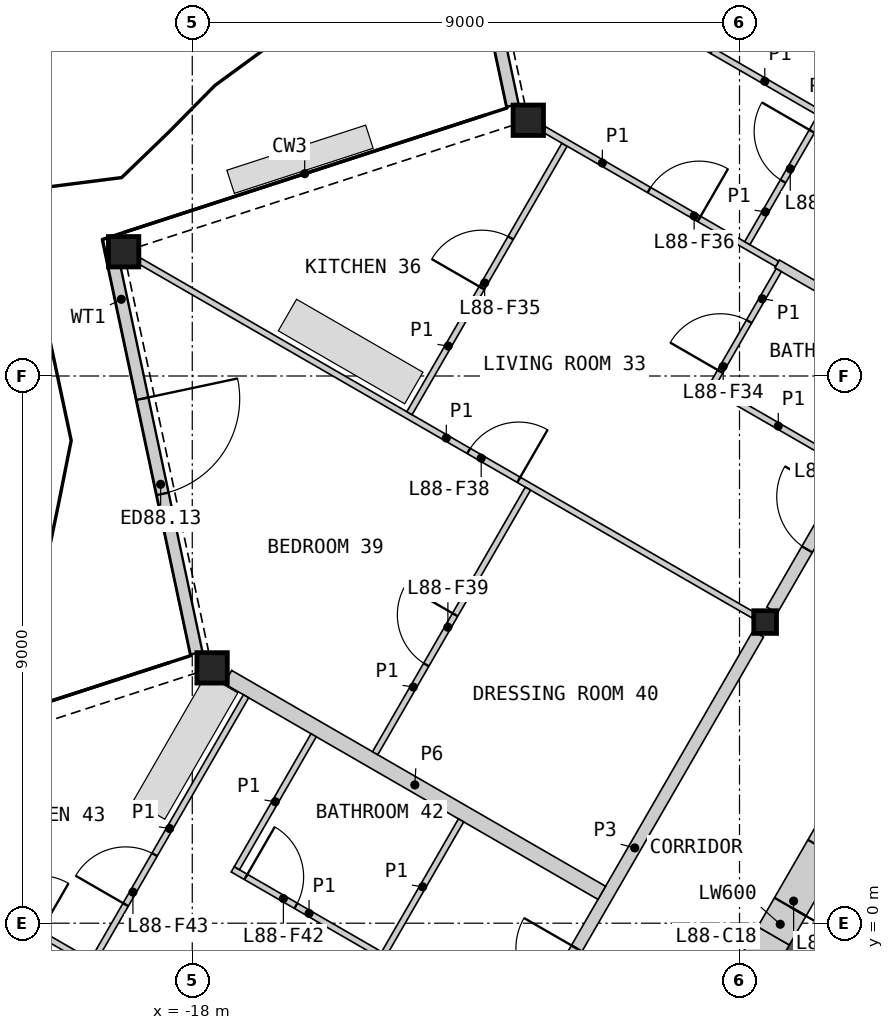
"""IFC4 building model, lengths in metres.
Left out: names, types, materials, properties, quantities, classifications, styles, units other than length and angle.
Written with IfcOpenShell. Run it as: python <this file> out.ifc"""

import sys

from ifc_helpers import new_model, si_unit, direction, frame, frame_2d, origin, origin_2d, place, context, subcontext, project, spatial, polyline, rectangle, hollow_rectangle, i_section, outline, extrude, element, fill, save


model = new_model("IFC4")
c1 = context("Model", 3, precision=1e-05, world=origin(), true_north=direction((0.0, 1.0)))
c2 = subcontext(c1, "Body", "Model", "MODEL_VIEW")
j1 = project(units=[si_unit("LENGTHUNIT", "METRE"), si_unit("PLANEANGLEUNIT", "RADIAN")], contexts=[c1])
p1 = place(None, origin())
s1 = spatial("IfcSite", under=j1, at=p1, CompositionType="ELEMENT")
p2 = place(p1, origin())
s2 = spatial("IfcBuilding", under=s1, at=p2, CompositionType="ELEMENT")
p3 = place(p2, frame((0.0, 0.0, 388.2)))
s3 = spatial("IfcBuildingStorey", under=s2, at=p3, CompositionType="ELEMENT", Elevation=388.2)
for number, where, z_axis, x_axis in (
    (1, (-12.474, 13.206, 0.0), (0.0, 0.0, 1.0), (1.0, 0.0, 0.0)),
    (2, (-19.129, 11.044, 0.0), (0.0, 0.0, 1.0), (1.0, 0.0, 0.0)),
    (3, (-17.674, 4.199, 0.0), (0.0, 0.0, 1.0), (1.0, 0.0, 0.0)),
):
    element("IfcColumn", number, at=place(p3, frame(where, z_axis=z_axis, x_axis=x_axis)), inside=s3, PredefinedType="COLUMN", context=c2, shape_type="SweptSolid", body=[
        extrude(hollow_rectangle(XDim=0.5, YDim=0.5, WallThickness=0.03, at=origin_2d()), origin(), (0.0, 0.0, 1.0), 3.4),
    ])
p4 = place(p3, frame((-8.578, 4.953, 0.0), z_axis=(0.0, 0.0, 1.0), x_axis=(1.0, 0.0, 0.0)))
e4 = element("IfcColumn", 4, at=p4, inside=s3, PredefinedType="COLUMN", context=c2, shape_type="SweptSolid", body=[
    extrude(i_section(OverallWidth=0.374, OverallDepth=0.372, WebThickness=0.016, FlangeThickness=0.026, at=origin_2d()), origin(), (0.0, 0.0, 1.0), 3.4),
])
p5 = place(p3, frame((-14.104, 19.915, 0.0), z_axis=(0.0, 0.0, 1.0), x_axis=(0.207924998532, -0.978144771997, 0.0)))
e5 = element("IfcWall", 5, at=p5, inside=s3, PredefinedType="SOLIDWALL", context=c2, shape_type="SweptSolid", body=[
    extrude(rectangle(XDim=6.612, YDim=0.2, at=frame_2d((3.306, 0.0))), origin(), (0.0, 0.0, 1.0), 2.634),
])
p6 = place(p5, frame((2.333, 0.0, 0.0)))
e6 = element("IfcOpeningElement", 6, at=p6, cuts=e5, PredefinedType="OPENING", context=c2, shape_type="SweptSolid", body=[
    extrude(rectangle(XDim=1.6, YDim=2.25, at=frame_2d((0.8, 1.125))), frame((0.0, 0.11, 0.0), z_axis=(0.0, -1.0, 0.0), x_axis=(1.0, 0.0, 0.0)), (0.0, 0.0, 1.0), 0.22),
])
p7 = place(p3, frame((-19.304, 10.909, 0.0), z_axis=(0.0, 0.0, 1.0), x_axis=(0.207882161022, -0.97815387702, 0.0)))
e7 = element("IfcWall", 7, at=p7, inside=s3, PredefinedType="SOLIDWALL", context=c2, shape_type="SweptSolid", body=[
    extrude(rectangle(XDim=6.612, YDim=0.2, at=frame_2d((3.306, 0.0))), origin(), (0.0, 0.0, 1.0), 2.634),
])
p8 = place(p7, frame((2.333, 0.0, 0.0)))
e8 = element("IfcOpeningElement", 8, at=p8, cuts=e7, PredefinedType="OPENING", context=c2, shape_type="SweptSolid", body=[
    extrude(rectangle(XDim=1.6, YDim=2.25, at=frame_2d((0.8, 1.125))), frame((0.0, 0.11, 0.0), z_axis=(0.0, -1.0, 0.0), x_axis=(1.0, 0.0, 0.0)), (0.0, 0.0, 1.0), 0.22),
])
p9 = place(p3, origin())
e9 = element("IfcWall", 9, at=p9, inside=s3, PredefinedType="SHEAR", context=c2, shape_type="SweptSolid", body=[
    extrude(outline(polyline([(-6.061, -1.697), (-8.231, -0.444), (-8.131, -0.271), (-5.96, -1.524), (-6.061, -1.697)])), origin(), (0.0, 0.0, 1.0), 3.1),
])
p10 = place(p3, frame((-8.44, -0.208, 0.0), z_axis=(0.0, 0.0, 1.0), x_axis=(-0.500001951578, -0.866024277037, 0.0)))
e10 = element("IfcWall", 10, at=p10, inside=s3, PredefinedType="SHEAR", context=c2, shape_type="SweptSolid", body=[
    extrude(rectangle(XDim=2.243, YDim=0.6, at=frame_2d((1.122, 0.0))), origin(), (0.0, 0.0, 1.0), 3.1),
])
p11 = place(p10, frame((0.7, 0.0, 0.0)))
e11 = element("IfcOpeningElement", 11, at=p11, cuts=e10, PredefinedType="OPENING", context=c2, shape_type="SweptSolid", body=[
    extrude(rectangle(XDim=1.0, YDim=2.1, at=frame_2d((0.5, 1.05))), frame((0.0, 0.31, 0.0), z_axis=(0.0, -1.0, 0.0), x_axis=(1.0, 0.0, 0.0)), (0.0, 0.0, 1.0), 0.62),
])
p12 = place(p3, frame((-7.34, 1.698, 0.0), z_axis=(0.0, 0.0, 1.0), x_axis=(-0.50002983664, -0.866008176907, 0.0)))
e12 = element("IfcWall", 12, at=p12, inside=s3, PredefinedType="SHEAR", context=c2, shape_type="SweptSolid", body=[
    extrude(rectangle(XDim=2.2, YDim=0.6, at=frame_2d((1.1, 0.0))), origin(), (0.0, 0.0, 1.0), 3.1),
])
p13 = place(p12, frame((0.55, 0.0, 0.0)))
e13 = element("IfcOpeningElement", 13, at=p13, cuts=e12, PredefinedType="OPENING", context=c2, shape_type="SweptSolid", body=[
    extrude(rectangle(XDim=1.1, YDim=2.1, at=frame_2d((0.55, 1.05))), frame((0.0, 0.31, 0.0), z_axis=(0.0, -1.0, 0.0), x_axis=(1.0, 0.0, 0.0)), (0.0, 0.0, 1.0), 0.62),
])
p14 = place(p3, frame((-8.465, 5.15, 0.0), z_axis=(0.0, 0.0, 1.0), x_axis=(0.499992155518, 0.866029932751, 0.0)))
e14 = element("IfcWall", 14, at=p14, inside=s3, PredefinedType="PARTITIONING", context=c2, shape_type="SweptSolid", body=[
    extrude(rectangle(XDim=8.123, YDim=0.2, at=frame_2d((4.062, 0.0))), origin(), (0.0, 0.0, 1.0), 3.1),
])
p15 = place(p14, frame((1.153, 0.0, 0.0)))
e15 = element("IfcOpeningElement", 15, at=p15, cuts=e14, PredefinedType="OPENING", context=c2, shape_type="SweptSolid", body=[
    extrude(rectangle(XDim=1.0, YDim=2.1, at=frame_2d((0.5, 1.05))), frame((0.0, 0.11, 0.0), z_axis=(0.0, -1.0, 0.0), x_axis=(1.0, 0.0, 0.0)), (0.0, 0.0, 1.0), 0.22),
])
p16 = place(p3, frame((-12.754, -2.279, 0.0), z_axis=(0.0, 0.0, 1.0), x_axis=(0.500001682468, 0.866024432409, 0.0)))
e16 = element("IfcWall", 16, at=p16, inside=s3, PredefinedType="PARTITIONING", context=c2, shape_type="SweptSolid", body=[
    extrude(rectangle(XDim=8.124, YDim=0.2, at=frame_2d((4.062, 0.0))), origin(), (0.0, 0.0, 1.0), 3.1),
])
p17 = place(p16, frame((1.153, 0.0, 0.0)))
e17 = element("IfcOpeningElement", 17, at=p17, cuts=e16, PredefinedType="OPENING", context=c2, shape_type="SweptSolid", body=[
    extrude(rectangle(XDim=1.0, YDim=2.1, at=frame_2d((0.5, 1.05))), frame((0.0, 0.11, 0.0), z_axis=(0.0, -1.0, 0.0), x_axis=(1.0, 0.0, 0.0)), (0.0, 0.0, 1.0), 0.22),
])
p18 = place(p3, frame((-17.414, 4.049, 0.0), z_axis=(0.0, 0.0, 1.0), x_axis=(0.866033839264, -0.499985389037, 0.0)))
e18 = element("IfcWall", 18, at=p18, inside=s3, PredefinedType="PARTITIONING", context=c2, shape_type="SweptSolid", body=[
    extrude(rectangle(XDim=7.1, YDim=0.25, at=frame_2d((3.55, 0.0))), origin(), (0.0, 0.0, 1.0), 2.33),
])
p19 = place(p3, frame((-8.382, 10.844, 0.0), z_axis=(0.0, 0.0, 1.0), x_axis=(0.866021425885, -0.500006889861, 0.0)))
e19 = element("IfcWall", 19, at=p19, inside=s3, PredefinedType="PLUMBINGWALL", context=c2, shape_type="SweptSolid", body=[
    extrude(rectangle(XDim=2.675, YDim=0.15, at=frame_2d((1.337, 0.0))), origin(), (0.0, 0.0, 1.0), 2.33),
])
p20 = place(p3, frame((-24.069, 1.887, 0.0), z_axis=(0.0, 0.0, 1.0), x_axis=(0.866023404247, -0.500003463284, 0.0)))
e20 = element("IfcWall", 20, at=p20, inside=s3, PredefinedType="PARTITIONING", context=c2, shape_type="SweptSolid", body=[
    extrude(rectangle(XDim=11.782, YDim=0.1, at=frame_2d((5.891, 0.0))), origin(), (0.0, 0.0, 1.0), 2.33),
])
p21 = place(p20, frame((3.159, 0.0, 0.0)))
e21 = element("IfcOpeningElement", 21, at=p21, cuts=e20, PredefinedType="OPENING", context=c2, shape_type="SweptSolid", body=[
    extrude(rectangle(XDim=0.95, YDim=2.1, at=frame_2d((0.475, 1.05))), frame((0.0, 0.06, 0.0), z_axis=(0.0, -1.0, 0.0), x_axis=(1.0, 0.0, 0.0)), (0.0, 0.0, 1.0), 0.12),
])
p22 = place(p3, frame((-18.869, 10.894, 0.0), z_axis=(0.0, 0.0, 1.0), x_axis=(0.866023724155, -0.500002909193, 0.0)))
e22 = element("IfcWall", 22, at=p22, inside=s3, PredefinedType="PARTITIONING", context=c2, shape_type="SweptSolid", body=[
    extrude(rectangle(XDim=11.655, YDim=0.1, at=frame_2d((5.827, 0.0))), origin(), (0.0, 0.0, 1.0), 2.33),
])
p23 = place(p22, frame((6.253, 0.0, 0.0)))
e23 = element("IfcOpeningElement", 23, at=p23, cuts=e22, PredefinedType="OPENING", context=c2, shape_type="SweptSolid", body=[
    extrude(rectangle(XDim=0.95, YDim=2.1, at=frame_2d((0.475, 1.05))), frame((0.0, 0.06, 0.0), z_axis=(0.0, -1.0, 0.0), x_axis=(1.0, 0.0, 0.0)), (0.0, 0.0, 1.0), 0.12),
])
p24 = place(p3, frame((-9.517, 14.328, 0.0), z_axis=(0.0, 0.0, 1.0), x_axis=(0.499996545922, 0.866027397988, 0.0)))
e24 = element("IfcWall", 24, at=p24, inside=s3, PredefinedType="PARTITIONING", context=c2, shape_type="SweptSolid", body=[
    extrude(rectangle(XDim=5.5, YDim=0.1, at=frame_2d((2.75, 0.0))), origin(), (0.0, 0.0, 1.0), 2.33),
])
p25 = place(p24, frame((4.3, 0.0, 0.0)))
e25 = element("IfcOpeningElement", 25, at=p25, cuts=e24, PredefinedType="OPENING", context=c2, shape_type="SweptSolid", body=[
    extrude(rectangle(XDim=0.95, YDim=2.1, at=frame_2d((0.475, 1.05))), frame((0.0, 0.06, 0.0), z_axis=(0.0, -1.0, 0.0), x_axis=(1.0, 0.0, 0.0)), (0.0, 0.0, 1.0), 0.12),
])
p26 = place(p24, frame((0.25, 0.0, 0.0)))
e26 = element("IfcOpeningElement", 26, at=p26, cuts=e24, PredefinedType="OPENING", context=c2, shape_type="SweptSolid", body=[
    extrude(rectangle(XDim=0.95, YDim=2.1, at=frame_2d((0.475, 1.05))), frame((0.0, 0.06, 0.0), z_axis=(0.0, -1.0, 0.0), x_axis=(1.0, 0.0, 0.0)), (0.0, 0.0, 1.0), 0.12),
])
p27 = place(p3, frame((-19.628, -0.619, 0.0), z_axis=(0.0, 0.0, 1.0), x_axis=(0.499990214365, 0.86603105345, 0.0)))
e27 = element("IfcWall", 27, at=p27, inside=s3, PredefinedType="PARTITIONING", context=c2, shape_type="SweptSolid", body=[
    extrude(rectangle(XDim=5.025, YDim=0.1, at=frame_2d((2.512, 0.0))), origin(), (0.0, 0.0, 1.0), 2.33),
])
p28 = place(p27, frame((1.067, 0.0, 0.0)))
e28 = element("IfcOpeningElement", 28, at=p28, cuts=e27, PredefinedType="OPENING", context=c2, shape_type="SweptSolid", body=[
    extrude(rectangle(XDim=0.95, YDim=2.1, at=frame_2d((0.475, 1.05))), frame((0.0, 0.06, 0.0), z_axis=(0.0, -1.0, 0.0), x_axis=(1.0, 0.0, 0.0)), (0.0, 0.0, 1.0), 0.12),
])
p29 = place(p3, frame((-14.992, 2.796, 0.0), z_axis=(0.0, 0.0, 1.0), x_axis=(0.499990214365, 0.86603105345, 0.0)))
e29 = element("IfcWall", 29, at=p29, inside=s3, PredefinedType="PARTITIONING", context=c2, shape_type="SweptSolid", body=[
    extrude(rectangle(XDim=5.025, YDim=0.1, at=frame_2d((2.512, 0.0))), origin(), (0.0, 0.0, 1.0), 2.33),
])
p30 = place(p29, frame((1.68, 0.0, 0.0)))
e30 = element("IfcOpeningElement", 30, at=p30, cuts=e29, PredefinedType="OPENING", context=c2, shape_type="SweptSolid", body=[
    extrude(rectangle(XDim=0.95, YDim=2.1, at=frame_2d((0.475, 1.05))), frame((0.0, 0.06, 0.0), z_axis=(0.0, -1.0, 0.0), x_axis=(1.0, 0.0, 0.0)), (0.0, 0.0, 1.0), 0.12),
])
p31 = place(p3, frame((-14.428, 8.388, 0.0), z_axis=(0.0, 0.0, 1.0), x_axis=(0.500005610874, 0.86602216432, 0.0)))
e31 = element("IfcWall", 31, at=p31, inside=s3, PredefinedType="PARTITIONING", context=c2, shape_type="SweptSolid", body=[
    extrude(rectangle(XDim=5.1, YDim=0.1, at=frame_2d((2.55, 0.0))), origin(), (0.0, 0.0, 1.0), 2.33),
])
p32 = place(p31, frame((2.379, 0.0, 0.0)))
e32 = element("IfcOpeningElement", 32, at=p32, cuts=e31, PredefinedType="OPENING", context=c2, shape_type="SweptSolid", body=[
    extrude(rectangle(XDim=0.95, YDim=2.1, at=frame_2d((0.475, 1.05))), frame((0.0, 0.06, 0.0), z_axis=(0.0, -1.0, 0.0), x_axis=(1.0, 0.0, 0.0)), (0.0, 0.0, 1.0), 0.12),
])
p33 = place(p3, frame((-12.214, 13.056, 0.0), z_axis=(0.0, 0.0, 1.0), x_axis=(0.866017452598, -0.500013771606, 0.0)))
e33 = element("IfcWall", 33, at=p33, inside=s3, PredefinedType="PARTITIONING", context=c2, shape_type="SweptSolid", body=[
    extrude(rectangle(XDim=4.425, YDim=0.1, at=frame_2d((2.213, 0.0))), origin(), (0.0, 0.0, 1.0), 2.33),
])
p34 = place(p33, frame((1.994, 0.0, 0.0)))
e34 = element("IfcOpeningElement", 34, at=p34, cuts=e33, PredefinedType="OPENING", context=c2, shape_type="SweptSolid", body=[
    extrude(rectangle(XDim=0.95, YDim=2.1, at=frame_2d((0.475, 1.05))), frame((0.0, 0.06, 0.0), z_axis=(0.0, -1.0, 0.0), x_axis=(1.0, 0.0, 0.0)), (0.0, 0.0, 1.0), 0.12),
])
p35 = place(p3, frame((-17.335, 0.886, 0.0), z_axis=(0.0, 0.0, 1.0), x_axis=(0.866032775405, -0.499987231761, 0.0)))
e35 = element("IfcWall", 35, at=p35, inside=s3, PredefinedType="PARTITIONING", context=c2, shape_type="SweptSolid", body=[
    extrude(rectangle(XDim=2.9, YDim=0.1, at=frame_2d((1.45, 0.0))), origin(), (0.0, 0.0, 1.0), 2.33),
])
p36 = place(p35, frame((0.25, 0.0, 0.0)))
e36 = element("IfcOpeningElement", 36, at=p36, cuts=e35, PredefinedType="OPENING", context=c2, shape_type="SweptSolid", body=[
    extrude(rectangle(XDim=0.95, YDim=2.1, at=frame_2d((0.475, 1.05))), frame((0.0, 0.06, 0.0), z_axis=(0.0, -1.0, 0.0), x_axis=(1.0, 0.0, 0.0)), (0.0, 0.0, 1.0), 0.12),
])
p37 = place(p3, frame((-9.51, 8.839, 0.0), z_axis=(0.0, 0.0, 1.0), x_axis=(0.866029095148, -0.499993606316, 0.0)))
e37 = element("IfcWall", 37, at=p37, inside=s3, PredefinedType="PARTITIONING", context=c2, shape_type="SweptSolid", body=[
    extrude(rectangle(XDim=2.65, YDim=0.1, at=frame_2d((1.325, 0.0))), origin(), (0.0, 0.0, 1.0), 2.33),
])
p38 = place(p3, frame((-17.267, 0.905, 0.0), z_axis=(0.0, 0.0, 1.0), x_axis=(0.499976333282, 0.866039067339, 0.0)))
e38 = element("IfcWall", 38, at=p38, inside=s3, PredefinedType="PARTITIONING", context=c2, shape_type="SweptSolid", body=[
    extrude(rectangle(XDim=2.525, YDim=0.1, at=frame_2d((1.262, 0.0))), origin(), (0.0, 0.0, 1.0), 2.33),
])
p39 = place(p3, frame((-14.842, -0.496, 0.0), z_axis=(0.0, 0.0, 1.0), x_axis=(0.500048846702, 0.865997200291, 0.0)))
e39 = element("IfcWall", 39, at=p39, inside=s3, PredefinedType="PARTITIONING", context=c2, shape_type="SweptSolid", body=[
    extrude(rectangle(XDim=2.525, YDim=0.1, at=frame_2d((1.263, 0.0))), origin(), (0.0, 0.0, 1.0), 2.33),
])
p40 = place(p3, frame((-8.872, 11.184, 0.0), z_axis=(0.0, 0.0, 1.0), x_axis=(0.499986429846, 0.866033238375, 0.0)))
e40 = element("IfcWall", 40, at=p40, inside=s3, PredefinedType="PARTITIONING", context=c2, shape_type="SweptSolid", body=[
    extrude(rectangle(XDim=2.375, YDim=0.1, at=frame_2d((1.188, 0.0))), origin(), (0.0, 0.0, 1.0), 2.33),
])
p41 = place(p40, frame((1.175, 0.0, 0.0)))
e41 = element("IfcOpeningElement", 41, at=p41, cuts=e40, PredefinedType="OPENING", context=c2, shape_type="SweptSolid", body=[
    extrude(rectangle(XDim=0.95, YDim=2.1, at=frame_2d((0.475, 1.05))), frame((0.0, 0.06, 0.0), z_axis=(0.0, -1.0, 0.0), x_axis=(1.0, 0.0, 0.0)), (0.0, 0.0, 1.0), 0.12),
])
p42 = place(p3, frame((-9.442, 8.858, 0.0), z_axis=(0.0, 0.0, 1.0), x_axis=(0.499978335414, 0.866037911478, 0.0)))
e42 = element("IfcWall", 42, at=p42, inside=s3, PredefinedType="PARTITIONING", context=c2, shape_type="SweptSolid", body=[
    extrude(rectangle(XDim=2.175, YDim=0.1, at=frame_2d((1.087, 0.0))), origin(), (0.0, 0.0, 1.0), 2.33),
])
p43 = place(p42, frame((0.25, 0.0, 0.0)))
e43 = element("IfcOpeningElement", 43, at=p43, cuts=e42, PredefinedType="OPENING", context=c2, shape_type="SweptSolid", body=[
    extrude(rectangle(XDim=0.95, YDim=2.1, at=frame_2d((0.475, 1.05))), frame((0.0, 0.06, 0.0), z_axis=(0.0, -1.0, 0.0), x_axis=(1.0, 0.0, 0.0)), (0.0, 0.0, 1.0), 0.12),
])
p44 = place(p3, frame((-9.448, 14.346, 0.0), z_axis=(0.0, 0.0, 1.0), x_axis=(0.866020521143, -0.500008456887, 0.0)))
e44 = element("IfcWall", 44, at=p44, inside=s3, PredefinedType="PARTITIONING", context=c2, shape_type="SweptSolid", body=[
    extrude(rectangle(XDim=1.995, YDim=0.1, at=frame_2d((0.998, 0.0))), origin(), (0.0, 0.0, 1.0), 2.33),
])
p45 = place(p8, origin())
e45 = element("IfcDoor", 45, at=p45, inside=s3, OperationType="DOUBLE_DOOR_SINGLE_SWING", PredefinedType="DOOR", context=c2, shape_type="SweptSolid", body=[
    extrude(rectangle(XDim=1.6, YDim=2.25, at=frame_2d((0.8, 1.125))), frame((0.0, 0.025, 0.0), z_axis=(0.0, -1.0, 0.0), x_axis=(1.0, 0.0, 0.0)), (0.0, 0.0, 1.0), 0.05),
])
fill(e8, e45)
p46 = place(p13, origin())
e46 = element("IfcDoor", 46, at=p46, inside=s3, OperationType="SINGLE_SWING_RIGHT", PredefinedType="DOOR", context=c2, shape_type="SweptSolid", body=[
    extrude(rectangle(XDim=1.1, YDim=2.1, at=frame_2d((0.55, 1.05))), frame((0.0, 0.055, 0.0), z_axis=(0.0, -1.0, 0.0), x_axis=(1.0, 0.0, 0.0)), (0.0, 0.0, 1.0), 0.05),
])
fill(e13, e46)
p47 = place(p15, origin())
e47 = element("IfcDoor", 47, at=p47, inside=s3, OperationType="SINGLE_SWING_RIGHT", PredefinedType="DOOR", context=c2, shape_type="SweptSolid", body=[
    extrude(rectangle(XDim=1.0, YDim=2.1, at=frame_2d((0.5, 1.05))), frame((0.0, 0.025, 0.0), z_axis=(0.0, -1.0, 0.0), x_axis=(1.0, 0.0, 0.0)), (0.0, 0.0, 1.0), 0.05),
])
fill(e15, e47)
p48 = place(p43, origin())
e48 = element("IfcDoor", 48, at=p48, inside=s3, OperationType="SINGLE_SWING_LEFT", PredefinedType="DOOR", context=c2, shape_type="SweptSolid", body=[
    extrude(rectangle(XDim=0.95, YDim=2.1, at=frame_2d((0.475, 1.05))), frame((0.0, 0.025, 0.0), z_axis=(0.0, -1.0, 0.0), x_axis=(1.0, 0.0, 0.0)), (0.0, 0.0, 1.0), 0.05),
])
fill(e43, e48)
p49 = place(p32, origin())
e49 = element("IfcDoor", 49, at=p49, inside=s3, OperationType="SINGLE_SWING_LEFT", PredefinedType="DOOR", context=c2, shape_type="SweptSolid", body=[
    extrude(rectangle(XDim=0.95, YDim=2.1, at=frame_2d((0.475, 1.05))), frame((0.0, 0.025, 0.0), z_axis=(0.0, -1.0, 0.0), x_axis=(1.0, 0.0, 0.0)), (0.0, 0.0, 1.0), 0.05),
])
fill(e32, e49)
p50 = place(p34, origin())
e50 = element("IfcDoor", 50, at=p50, inside=s3, OperationType="SINGLE_SWING_RIGHT", PredefinedType="DOOR", context=c2, shape_type="SweptSolid", body=[
    extrude(rectangle(XDim=0.95, YDim=2.1, at=frame_2d((0.475, 1.05))), frame((0.0, 0.025, 0.0), z_axis=(0.0, -1.0, 0.0), x_axis=(1.0, 0.0, 0.0)), (0.0, 0.0, 1.0), 0.05),
])
fill(e34, e50)
p51 = place(p41, origin())
e51 = element("IfcDoor", 51, at=p51, inside=s3, OperationType="SINGLE_SWING_RIGHT", PredefinedType="DOOR", context=c2, shape_type="SweptSolid", body=[
    extrude(rectangle(XDim=0.95, YDim=2.1, at=frame_2d((0.475, 1.05))), frame((0.0, 0.025, 0.0), z_axis=(0.0, -1.0, 0.0), x_axis=(1.0, 0.0, 0.0)), (0.0, 0.0, 1.0), 0.05),
])
fill(e41, e51)
p52 = place(p23, origin())
e52 = element("IfcDoor", 52, at=p52, inside=s3, OperationType="SINGLE_SWING_RIGHT", PredefinedType="DOOR", context=c2, shape_type="SweptSolid", body=[
    extrude(rectangle(XDim=0.95, YDim=2.1, at=frame_2d((0.475, 1.05))), frame((0.0, 0.025, 0.0), z_axis=(0.0, -1.0, 0.0), x_axis=(1.0, 0.0, 0.0)), (0.0, 0.0, 1.0), 0.05),
])
fill(e23, e52)
p53 = place(p30, origin())
e53 = element("IfcDoor", 53, at=p53, inside=s3, OperationType="SINGLE_SWING_RIGHT", PredefinedType="DOOR", context=c2, shape_type="SweptSolid", body=[
    extrude(rectangle(XDim=0.95, YDim=2.1, at=frame_2d((0.475, 1.05))), frame((0.0, 0.025, 0.0), z_axis=(0.0, -1.0, 0.0), x_axis=(1.0, 0.0, 0.0)), (0.0, 0.0, 1.0), 0.05),
])
fill(e30, e53)
p54 = place(p17, origin())
e54 = element("IfcDoor", 54, at=p54, inside=s3, OperationType="SINGLE_SWING_RIGHT", PredefinedType="DOOR", context=c2, shape_type="SweptSolid", body=[
    extrude(rectangle(XDim=1.0, YDim=2.1, at=frame_2d((0.5, 1.05))), frame((0.0, 0.025, 0.0), z_axis=(0.0, -1.0, 0.0), x_axis=(1.0, 0.0, 0.0)), (0.0, 0.0, 1.0), 0.05),
])
fill(e17, e54)
p55 = place(p36, origin())
e55 = element("IfcDoor", 55, at=p55, inside=s3, OperationType="SINGLE_SWING_LEFT", PredefinedType="DOOR", context=c2, shape_type="SweptSolid", body=[
    extrude(rectangle(XDim=0.95, YDim=2.1, at=frame_2d((0.475, 1.05))), frame((0.0, 0.025, 0.0), z_axis=(0.0, -1.0, 0.0), x_axis=(1.0, 0.0, 0.0)), (0.0, 0.0, 1.0), 0.05),
])
fill(e36, e55)
p56 = place(p28, origin())
e56 = element("IfcDoor", 56, at=p56, inside=s3, OperationType="SINGLE_SWING_LEFT", PredefinedType="DOOR", context=c2, shape_type="SweptSolid", body=[
    extrude(rectangle(XDim=0.95, YDim=2.1, at=frame_2d((0.475, 1.05))), frame((0.0, 0.025, 0.0), z_axis=(0.0, -1.0, 0.0), x_axis=(1.0, 0.0, 0.0)), (0.0, 0.0, 1.0), 0.05),
])
fill(e28, e56)
save(model, sys.argv[1])
